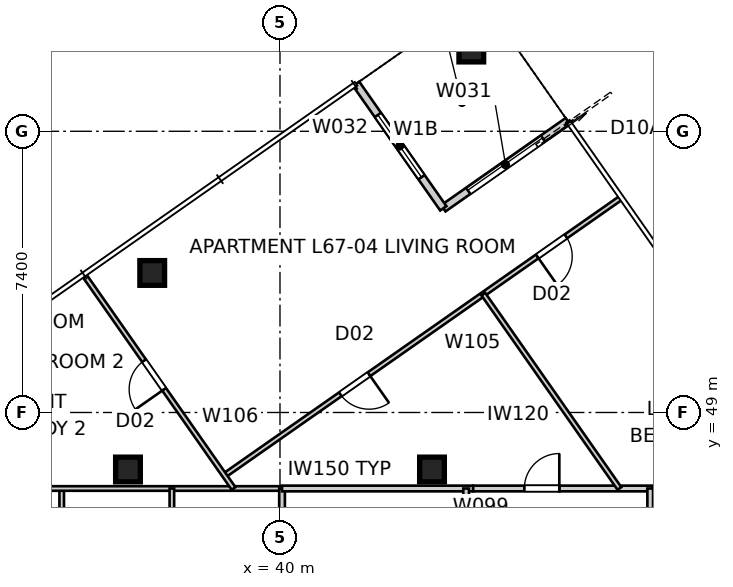
"""IFC4 building model, lengths in metres.
Left out: names, types, materials, properties, quantities, classifications, styles, units other than length and angle.
Written with IfcOpenShell. Run it as: python <this file> out.ifc"""

import sys

from ifc_helpers import new_model, si_unit, direction, frame, frame_2d, origin, origin_2d, place, context, subcontext, project, spatial, rectangle, extrude, element, fill, save


model = new_model("IFC4")
c1 = context("Model", 3, precision=1e-05, world=origin(), true_north=direction((0.0, 1.0)))
c2 = subcontext(c1, "Body", "Model", "MODEL_VIEW")
j1 = project(units=[si_unit("LENGTHUNIT", "METRE"), si_unit("PLANEANGLEUNIT", "RADIAN")], contexts=[c1])
p1 = place(None, origin())
s1 = spatial("IfcSite", under=j1, at=p1, CompositionType="ELEMENT")
p2 = place(p1, origin())
s2 = spatial("IfcBuilding", under=s1, at=p2, CompositionType="ELEMENT")
p3 = place(p2, frame((0.0, 0.0, 243.8)))
s3 = spatial("IfcBuildingStorey", under=s2, at=p3, CompositionType="ELEMENT", Elevation=243.8)
for number, where, z_axis, x_axis in (
    (1, (45.034, 58.551, 0.0), (0.0, 0.0, 1.0), (1.0, 0.0, 0.0)),
    (2, (36.638, 52.672, 0.0), (0.0, 0.0, 1.0), (1.0, 0.0, 0.0)),
    (3, (44.0, 47.5, 0.0), (0.0, 0.0, 1.0), (1.0, 0.0, 0.0)),
    (4, (36.0, 47.5, 0.0), (0.0, 0.0, 1.0), (1.0, 0.0, 0.0)),
):
    element("IfcColumn", number, at=place(p3, frame(where, z_axis=z_axis, x_axis=x_axis)), inside=s3, PredefinedType="COLUMN", context=c2, shape_type="SweptSolid", body=[
        extrude(rectangle(XDim=0.65, YDim=0.65, at=origin_2d()), origin(), (0.0, 0.0, 1.0), 3.4),
    ])
p4 = place(p3, frame((47.574, 56.667, 0.0), z_axis=(0.0, 0.0, 1.0), x_axis=(-0.819165963305, -0.573556557423, 0.0)))
e5 = element("IfcWall", 5, at=p4, inside=s3, PredefinedType="SOLIDWALL", context=c2, shape_type="SweptSolid", body=[
    extrude(rectangle(XDim=4.0, YDim=0.2, at=frame_2d((2.0, 0.0))), origin(), (0.0, 0.0, 1.0), 3.25),
])
p5 = place(p4, frame((0.8, 0.0, 0.0)))
e6 = element("IfcOpeningElement", 6, at=p5, cuts=e5, PredefinedType="OPENING", context=c2, shape_type="SweptSolid", body=[
    extrude(rectangle(XDim=2.4, YDim=2.1, at=frame_2d((1.2, 1.05))), frame((0.0, 0.11, 0.0), z_axis=(0.0, -1.0, 0.0), x_axis=(1.0, 0.0, 0.0)), (0.0, 0.0, 1.0), 0.22),
])
p6 = place(p3, frame((44.298, 54.373, 0.0), z_axis=(0.0, 0.0, 1.0), x_axis=(-0.573597512525, 0.819137286189, 0.0)))
e7 = element("IfcWall", 7, at=p6, inside=s3, PredefinedType="SOLIDWALL", context=c2, shape_type="SweptSolid", body=[
    extrude(rectangle(XDim=4.0, YDim=0.2, at=frame_2d((2.0, 0.0))), origin(), (0.0, 0.0, 1.0), 3.25),
])
p7 = place(p6, frame((1.0, 0.0, 0.45)))
e8 = element("IfcOpeningElement", 8, at=p7, cuts=e7, PredefinedType="OPENING", context=c2, shape_type="SweptSolid", body=[
    extrude(rectangle(XDim=2.0, YDim=1.8, at=frame_2d((1.0, 0.9))), frame((0.0, 0.11, 0.0), z_axis=(0.0, -1.0, 0.0), x_axis=(1.0, 0.0, 0.0)), (0.0, 0.0, 1.0), 0.22),
])
p8 = place(p3, frame((34.256, 47.0, 0.0), z_axis=(0.0, 0.0, 1.0), x_axis=(0.0, -1.0, 0.0)))
e9 = element("IfcWall", 9, at=p8, inside=s3, PredefinedType="PARTITIONING", context=c2, shape_type="SweptSolid", body=[
    extrude(rectangle(XDim=4.9, YDim=0.12, at=frame_2d((2.45, 0.0))), origin(), (0.0, 0.0, 1.0), 2.796),
])
p9 = place(p8, frame((1.97, 0.0, 0.0)))
e10 = element("IfcOpeningElement", 10, at=p9, cuts=e9, PredefinedType="OPENING", context=c2, shape_type="SweptSolid", body=[
    extrude(rectangle(XDim=0.96, YDim=2.1, at=frame_2d((0.48, 1.05))), frame((0.0, 0.07, 0.0), z_axis=(0.0, -1.0, 0.0), x_axis=(1.0, 0.0, 0.0)), (0.0, 0.0, 1.0), 0.14),
])
p10 = place(p3, frame((28.708, 47.0, 0.0), z_axis=(0.0, 0.0, 1.0), x_axis=(1.0, 0.0, 0.0)))
e11 = element("IfcWall", 11, at=p10, inside=s3, PredefinedType="PARTITIONING", context=c2, shape_type="SweptSolid", body=[
    extrude(rectangle(XDim=11.346, YDim=0.12, at=frame_2d((5.673, 0.0))), origin(), (0.0, 0.0, 1.0), 2.55),
])
p11 = place(p10, frame((0.477, 0.0, 0.0)))
e12 = element("IfcOpeningElement", 12, at=p11, cuts=e11, PredefinedType="OPENING", context=c2, shape_type="SweptSolid", body=[
    extrude(rectangle(XDim=0.92, YDim=2.34, at=frame_2d((0.46, 1.17))), frame((0.0, 0.07, 0.0), z_axis=(0.0, -1.0, 0.0), x_axis=(1.0, 0.0, 0.0)), (0.0, 0.0, 1.0), 0.14),
])
p12 = place(p3, frame((37.155, 42.1, 0.0), z_axis=(0.0, 0.0, 1.0), x_axis=(0.0, 1.0, 0.0)))
e13 = element("IfcWall", 13, at=p12, inside=s3, PredefinedType="PARTITIONING", context=c2, shape_type="SweptSolid", body=[
    extrude(rectangle(XDim=4.9, YDim=0.12, at=frame_2d((2.45, 0.0))), origin(), (0.0, 0.0, 1.0), 2.796),
])
p13 = place(p12, frame((1.97, 0.0, 0.0)))
e14 = element("IfcOpeningElement", 14, at=p13, cuts=e13, PredefinedType="OPENING", context=c2, shape_type="SweptSolid", body=[
    extrude(rectangle(XDim=0.96, YDim=2.1, at=frame_2d((0.48, 1.05))), frame((0.0, 0.07, 0.0), z_axis=(0.0, -1.0, 0.0), x_axis=(1.0, 0.0, 0.0)), (0.0, 0.0, 1.0), 0.14),
])
p14 = place(p3, frame((40.054, 47.0, 0.0), z_axis=(0.0, 0.0, 1.0), x_axis=(0.0, -1.0, 0.0)))
e15 = element("IfcWall", 15, at=p14, inside=s3, PredefinedType="SOLIDWALL", context=c2, shape_type="SweptSolid", body=[
    extrude(rectangle(XDim=4.9, YDim=0.15, at=frame_2d((2.45, 0.0))), origin(), (0.0, 0.0, 1.0), 2.796),
])
p15 = place(p14, frame((1.97, 0.0, 0.0)))
e16 = element("IfcOpeningElement", 16, at=p15, cuts=e15, PredefinedType="OPENING", context=c2, shape_type="SweptSolid", body=[
    extrude(rectangle(XDim=0.96, YDim=2.1, at=frame_2d((0.48, 1.05))), frame((0.0, 0.085, 0.0), z_axis=(0.0, -1.0, 0.0), x_axis=(1.0, 0.0, 0.0)), (0.0, 0.0, 1.0), 0.17),
])
p16 = place(p3, frame((40.054, 47.0, 0.0), z_axis=(0.0, 0.0, 1.0), x_axis=(1.0, 0.0, 0.0)))
e17 = element("IfcWall", 17, at=p16, inside=s3, PredefinedType="SOLIDWALL", context=c2, shape_type="SweptSolid", body=[
    extrude(rectangle(XDim=5.029, YDim=0.15, at=frame_2d((2.515, 0.0))), origin(), (0.0, 0.0, 1.0), 3.25),
])
p17 = place(p3, frame((45.083, 47.0, 0.0), z_axis=(0.0, 0.0, 1.0), x_axis=(1.0, 0.0, 0.0)))
e18 = element("IfcWall", 18, at=p17, inside=s3, PredefinedType="SOLIDWALL", context=c2, shape_type="SweptSolid", body=[
    extrude(rectangle(XDim=2.267, YDim=0.15, at=frame_2d((1.133, 0.0))), origin(), (0.0, 0.0, 1.0), 2.55),
])
p18 = place(p17, frame((1.347, 0.0, 0.0)))
e19 = element("IfcOpeningElement", 19, at=p18, cuts=e18, PredefinedType="OPENING", context=c2, shape_type="SweptSolid", body=[
    extrude(rectangle(XDim=0.92, YDim=2.34, at=frame_2d((0.46, 1.17))), frame((0.0, 0.085, 0.0), z_axis=(0.0, -1.0, 0.0), x_axis=(1.0, 0.0, 0.0)), (0.0, 0.0, 1.0), 0.17),
])
p19 = place(p3, frame((47.35, 47.0, 0.0), z_axis=(0.0, 0.0, 1.0), x_axis=(1.0, 0.0, 0.0)))
e20 = element("IfcWall", 20, at=p19, inside=s3, PredefinedType="SOLIDWALL", context=c2, shape_type="SweptSolid", body=[
    extrude(rectangle(XDim=2.442, YDim=0.15, at=frame_2d((1.221, 0.0))), origin(), (0.0, 0.0, 1.0), 3.25),
])
p20 = place(p3, frame((44.898, 47.0, 0.0), z_axis=(0.0, 0.0, 1.0), x_axis=(0.0, -1.0, 0.0)))
e21 = element("IfcWall", 21, at=p20, inside=s3, PredefinedType="SOLIDWALL", context=c2, shape_type="SweptSolid", body=[
    extrude(rectangle(XDim=4.9, YDim=0.15, at=frame_2d((2.45, 0.0))), origin(), (0.0, 0.0, 1.0), 3.25),
])
p21 = place(p3, frame((49.792, 47.0, 0.0), z_axis=(0.0, 0.0, 1.0), x_axis=(1.0, 0.0, 0.0)))
e22 = element("IfcWall", 22, at=p21, inside=s3, PredefinedType="PARTITIONING", context=c2, shape_type="SweptSolid", body=[
    extrude(rectangle(XDim=4.502, YDim=0.12, at=frame_2d((2.251, 0.0))), origin(), (0.0, 0.0, 1.0), 3.25),
])
p22 = place(p3, frame((49.742, 42.1, 0.0), z_axis=(0.0, 0.0, 1.0), x_axis=(0.0, 1.0, 0.0)))
e23 = element("IfcWall", 23, at=p22, inside=s3, PredefinedType="SOLIDWALL", context=c2, shape_type="SweptSolid", body=[
    extrude(rectangle(XDim=4.9, YDim=0.15, at=frame_2d((2.45, 0.0))), origin(), (0.0, 0.0, 1.0), 3.25),
])
p23 = place(p22, frame((1.99, 0.0, 0.0)))
e24 = element("IfcOpeningElement", 24, at=p23, cuts=e23, PredefinedType="OPENING", context=c2, shape_type="SweptSolid", body=[
    extrude(rectangle(XDim=0.92, YDim=2.34, at=frame_2d((0.46, 1.17))), frame((0.0, 0.085, 0.0), z_axis=(0.0, -1.0, 0.0), x_axis=(1.0, 0.0, 0.0)), (0.0, 0.0, 1.0), 0.17),
])
p24 = place(p3, frame((48.949, 54.633, 0.0), z_axis=(0.0, 0.0, 1.0), x_axis=(-0.819155207289, -0.573571919092, 0.0)))
e25 = element("IfcWall", 25, at=p24, inside=s3, PredefinedType="PARTITIONING", context=c2, shape_type="SweptSolid", body=[
    extrude(rectangle(XDim=12.71, YDim=0.12, at=frame_2d((6.355, 0.0))), origin(), (0.0, 0.0, 1.0), 3.25),
])
p25 = place(p24, frame((8.066, 0.0, 0.0)))
e26 = element("IfcOpeningElement", 26, at=p25, cuts=e25, PredefinedType="OPENING", context=c2, shape_type="SweptSolid", body=[
    extrude(rectangle(XDim=0.92, YDim=2.34, at=frame_2d((0.46, 1.17))), frame((0.0, 0.07, 0.0), z_axis=(0.0, -1.0, 0.0), x_axis=(1.0, 0.0, 0.0)), (0.0, 0.0, 1.0), 0.14),
])
p26 = place(p24, frame((1.741, 0.0, 0.0)))
e27 = element("IfcOpeningElement", 27, at=p26, cuts=e25, PredefinedType="OPENING", context=c2, shape_type="SweptSolid", body=[
    extrude(rectangle(XDim=0.92, YDim=2.34, at=frame_2d((0.46, 1.17))), frame((0.0, 0.07, 0.0), z_axis=(0.0, -1.0, 0.0), x_axis=(1.0, 0.0, 0.0)), (0.0, 0.0, 1.0), 0.14),
])
p27 = place(p3, frame((38.778, 47.0, 0.0), z_axis=(0.0, 0.0, 1.0), x_axis=(-0.57357503053, 0.819153028653, 0.0)))
e28 = element("IfcWall", 28, at=p27, inside=s3, PredefinedType="PARTITIONING", context=c2, shape_type="SweptSolid", body=[
    extrude(rectangle(XDim=6.834, YDim=0.12, at=frame_2d((3.417, 0.0))), origin(), (0.0, 0.0, 1.0), 3.25),
])
p28 = place(p27, frame((3.186, 0.0, 0.0)))
e29 = element("IfcOpeningElement", 29, at=p28, cuts=e28, PredefinedType="OPENING", context=c2, shape_type="SweptSolid", body=[
    extrude(rectangle(XDim=0.92, YDim=2.34, at=frame_2d((0.46, 1.17))), frame((0.0, 0.07, 0.0), z_axis=(0.0, -1.0, 0.0), x_axis=(1.0, 0.0, 0.0)), (0.0, 0.0, 1.0), 0.14),
])
p29 = place(p3, frame((48.932, 47.0, 0.0), z_axis=(0.0, 0.0, 1.0), x_axis=(-0.573569946952, 0.819156588177, 0.0)))
e30 = element("IfcWall", 30, at=p29, inside=s3, PredefinedType="PARTITIONING", context=c2, shape_type="SweptSolid", body=[
    extrude(rectangle(XDim=6.243, YDim=0.12, at=frame_2d((3.122, 0.0))), origin(), (0.0, 0.0, 1.0), 3.25),
])
p30 = place(p5, origin())
e31 = element("IfcDoor", 31, at=p30, inside=s3, OperationType="SLIDING_TO_LEFT", PredefinedType="DOOR", context=c2, shape_type="SweptSolid", body=[
    extrude(rectangle(XDim=2.4, YDim=2.1, at=frame_2d((1.2, 1.05))), frame((0.0, 0.025, 0.0), z_axis=(0.0, -1.0, 0.0), x_axis=(1.0, 0.0, 0.0)), (0.0, 0.0, 1.0), 0.05),
])
fill(e6, e31)
p31 = place(p7, origin())
e32 = element("IfcWindow", 32, at=p31, inside=s3, PartitioningType="SINGLE_PANEL", PredefinedType="WINDOW", context=c2, shape_type="SweptSolid", body=[
    extrude(rectangle(XDim=2.0, YDim=1.8, at=frame_2d((1.0, 0.9))), frame((0.0, 0.03, 0.0), z_axis=(0.0, -1.0, 0.0), x_axis=(1.0, 0.0, 0.0)), (0.0, 0.0, 1.0), 0.06),
])
fill(e8, e32)
p32 = place(p28, origin())
e33 = element("IfcDoor", 33, at=p32, inside=s3, OperationType="SINGLE_SWING_LEFT", PredefinedType="DOOR", context=c2, shape_type="SweptSolid", body=[
    extrude(rectangle(XDim=0.92, YDim=2.34, at=frame_2d((0.46, 1.17))), frame((0.0, 0.025, 0.0), z_axis=(0.0, -1.0, 0.0), x_axis=(1.0, 0.0, 0.0)), (0.0, 0.0, 1.0), 0.05),
])
fill(e29, e33)
p33 = place(p25, origin())
e34 = element("IfcDoor", 34, at=p33, inside=s3, OperationType="SINGLE_SWING_LEFT", PredefinedType="DOOR", context=c2, shape_type="SweptSolid", body=[
    extrude(rectangle(XDim=0.92, YDim=2.34, at=frame_2d((0.46, 1.17))), frame((0.0, 0.025, 0.0), z_axis=(0.0, -1.0, 0.0), x_axis=(1.0, 0.0, 0.0)), (0.0, 0.0, 1.0), 0.05),
])
fill(e26, e34)
p34 = place(p26, origin())
e35 = element("IfcDoor", 35, at=p34, inside=s3, OperationType="SINGLE_SWING_RIGHT", PredefinedType="DOOR", context=c2, shape_type="SweptSolid", body=[
    extrude(rectangle(XDim=0.92, YDim=2.34, at=frame_2d((0.46, 1.17))), frame((0.0, 0.025, 0.0), z_axis=(0.0, -1.0, 0.0), x_axis=(1.0, 0.0, 0.0)), (0.0, 0.0, 1.0), 0.05),
])
fill(e27, e35)
p35 = place(p18, origin())
e36 = element("IfcDoor", 36, at=p35, inside=s3, OperationType="SINGLE_SWING_RIGHT", PredefinedType="DOOR", context=c2, shape_type="SweptSolid", body=[
    extrude(rectangle(XDim=0.92, YDim=2.34, at=frame_2d((0.46, 1.17))), frame((0.0, 0.025, 0.0), z_axis=(0.0, -1.0, 0.0), x_axis=(1.0, 0.0, 0.0)), (0.0, 0.0, 1.0), 0.05),
])
fill(e19, e36)
save(model, sys.argv[1])
